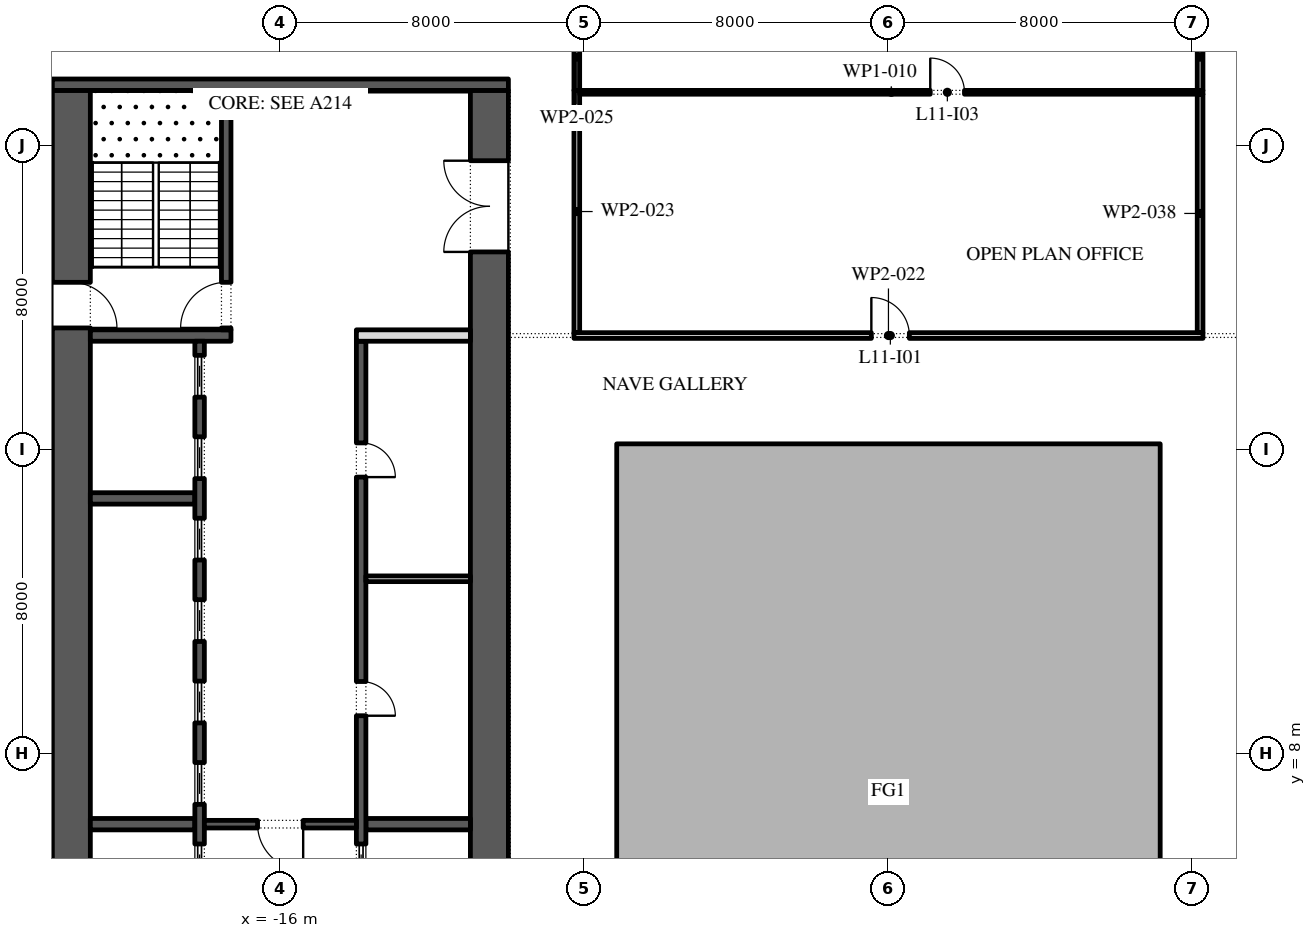
"""IFC4 building model, lengths in metres.
Left out: names, types, materials, properties, quantities, classifications, styles, units other than length and angle.
Written with IfcOpenShell. Run it as: python <this file> out.ifc"""

import sys

from ifc_helpers import new_model, si_unit, direction, frame, frame_2d, origin, place, context, subcontext, project, spatial, polyline, rectangle, outline, extrude, element, fill, save


model = new_model("IFC4")
c1 = context("Model", 3, precision=1e-05, world=origin(), true_north=direction((0.0, 1.0)))
c2 = subcontext(c1, "Body", "Model", "MODEL_VIEW")
j1 = project(units=[si_unit("LENGTHUNIT", "METRE"), si_unit("PLANEANGLEUNIT", "RADIAN")], contexts=[c1])
p1 = place(None, origin())
s1 = spatial("IfcSite", under=j1, at=p1, CompositionType="ELEMENT")
p2 = place(p1, origin())
s2 = spatial("IfcBuilding", under=s1, at=p2, CompositionType="ELEMENT")
p3 = place(p2, frame((0.0, 0.0, 56.4)))
s3 = spatial("IfcBuildingStorey", under=s2, at=p3, CompositionType="ELEMENT", Elevation=56.4)
p4 = place(p3, origin())
e1 = element("IfcWall", 1, at=p4, inside=s3, PredefinedType="STANDARD", context=c2, shape_type="SweptSolid", body=[
    extrude(outline(polyline([(-7.15, -2.15), (7.15, -2.15), (7.15, 16.15), (-7.15, 16.15), (-7.15, -2.15)]), holes=[polyline([(-7.0, -2.0), (-7.0, 16.0), (7.0, 16.0), (7.0, -2.0), (-7.0, -2.0)])]), origin(), (0.0, 0.0, 1.0), 4.0),
])
p5 = place(p3, frame((-21.5, -2.45, 0.0), z_axis=(0.0, 0.0, 1.0), x_axis=(0.0, 1.0, 0.0)))
e2 = element("IfcWall", 2, at=p5, inside=s3, PredefinedType="SHEAR", context=c2, shape_type="SweptSolid", body=[
    extrude(rectangle(XDim=27.9, YDim=1.0, at=frame_2d((13.95, 0.0))), origin(), (0.0, 0.0, 1.0), 4.0),
])
p6 = place(p5, frame((5.05, 0.0, 0.0)))
e3 = element("IfcOpeningElement", 3, at=p6, cuts=e2, PredefinedType="OPENING", context=c2, shape_type="SweptSolid", body=[
    extrude(rectangle(XDim=1.2, YDim=2.1, at=frame_2d((0.6, 1.05))), frame((0.0, 0.51, 0.0), z_axis=(0.0, -1.0, 0.0), x_axis=(1.0, 0.0, 0.0)), (0.0, 0.0, 1.0), 1.02),
])
p7 = place(p5, frame((21.65, 0.0, 0.0)))
e4 = element("IfcOpeningElement", 4, at=p7, cuts=e2, PredefinedType="OPENING", context=c2, shape_type="SweptSolid", body=[
    extrude(rectangle(XDim=1.2, YDim=2.1, at=frame_2d((0.6, 1.05))), frame((0.0, 0.51, 0.0), z_axis=(0.0, -1.0, 0.0), x_axis=(1.0, 0.0, 0.0)), (0.0, 0.0, 1.0), 1.02),
])
p8 = place(p3, frame((-10.5, -2.45, 0.0), z_axis=(0.0, 0.0, 1.0), x_axis=(0.0, 1.0, 0.0)))
e5 = element("IfcWall", 5, at=p8, inside=s3, PredefinedType="SHEAR", context=c2, shape_type="SweptSolid", body=[
    extrude(rectangle(XDim=27.9, YDim=1.0, at=frame_2d((13.95, 0.0))), origin(), (0.0, 0.0, 1.0), 4.0),
])
p9 = place(p8, frame((23.65, 0.0, 0.0)))
e6 = element("IfcOpeningElement", 6, at=p9, cuts=e5, PredefinedType="OPENING", context=c2, shape_type="SweptSolid", body=[
    extrude(rectangle(XDim=2.4, YDim=2.1, at=frame_2d((1.2, 1.05))), frame((0.0, 0.51, 0.0), z_axis=(0.0, -1.0, 0.0), x_axis=(1.0, 0.0, 0.0)), (0.0, 0.0, 1.0), 1.02),
])
p10 = place(p8, frame((1.387, 0.0, 0.0)))
e7 = element("IfcOpeningElement", 7, at=p10, cuts=e5, PredefinedType="OPENING", context=c2, shape_type="SweptSolid", body=[
    extrude(rectangle(XDim=0.9, YDim=2.1, at=frame_2d((0.45, 1.05))), frame((0.0, 0.51, 0.0), z_axis=(0.0, -1.0, 0.0), x_axis=(1.0, 0.0, 0.0)), (0.0, 0.0, 1.0), 1.02),
])
p11 = place(p8, frame((4.613, 0.0, 0.0)))
e8 = element("IfcOpeningElement", 8, at=p11, cuts=e5, PredefinedType="OPENING", context=c2, shape_type="SweptSolid", body=[
    extrude(rectangle(XDim=0.9, YDim=2.1, at=frame_2d((0.45, 1.05))), frame((0.0, 0.51, 0.0), z_axis=(0.0, -1.0, 0.0), x_axis=(1.0, 0.0, 0.0)), (0.0, 0.0, 1.0), 1.02),
])
p12 = place(p3, frame((-22.0, 25.6, 0.0), z_axis=(0.0, 0.0, 1.0), x_axis=(1.0, 0.0, 0.0)))
e9 = element("IfcWall", 9, at=p12, inside=s3, PredefinedType="SHEAR", context=c2, shape_type="SweptSolid", body=[
    extrude(rectangle(XDim=12.0, YDim=0.3, at=frame_2d((6.0, 0.0))), origin(), (0.0, 0.0, 1.0), 4.0),
])
p13 = place(p3, frame((-21.0, 19.0, 0.0), z_axis=(0.0, 0.0, 1.0), x_axis=(1.0, 0.0, 0.0)))
e10 = element("IfcWall", 10, at=p13, inside=s3, PredefinedType="SHEAR", context=c2, shape_type="SweptSolid", body=[
    extrude(rectangle(XDim=3.7, YDim=0.3, at=frame_2d((1.85, 0.0))), origin(), (0.0, 0.0, 1.0), 4.0),
])
p14 = place(p3, frame((-17.425, 19.15, 0.0), z_axis=(0.0, 0.0, 1.0), x_axis=(0.0, 1.0, 0.0)))
e11 = element("IfcWall", 11, at=p14, inside=s3, PredefinedType="SHEAR", context=c2, shape_type="SweptSolid", body=[
    extrude(rectangle(XDim=6.3, YDim=0.25, at=frame_2d((3.15, 0.0))), origin(), (0.0, 0.0, 1.0), 4.0),
])
p15 = place(p14, frame((0.05, 0.0, 0.0)))
e12 = element("IfcOpeningElement", 12, at=p15, cuts=e11, PredefinedType="OPENING", context=c2, shape_type="SweptSolid", body=[
    extrude(rectangle(XDim=1.2, YDim=2.1, at=frame_2d((0.6, 1.05))), frame((0.0, 0.135, 0.0), z_axis=(0.0, -1.0, 0.0), x_axis=(1.0, 0.0, 0.0)), (0.0, 0.0, 1.0), 0.27),
])
for number, where, z_axis, x_axis in (
    (13, (-21.0, 6.143, 0.0), (0.0, 0.0, 1.0), (1.0, 0.0, 0.0)),
    (14, (-21.0, 14.714, 0.0), (0.0, 0.0, 1.0), (1.0, 0.0, 0.0)),
):
    element("IfcWall", number, at=place(p3, frame(where, z_axis=z_axis, x_axis=x_axis)), inside=s3, PredefinedType="SHEAR", context=c2, shape_type="SweptSolid", body=[
        extrude(rectangle(XDim=2.75, YDim=0.3, at=frame_2d((1.375, 0.0))), origin(), (0.0, 0.0, 1.0), 4.0),
    ])
p16 = place(p3, frame((-18.125, 4.15, 0.0), z_axis=(0.0, 0.0, 1.0), x_axis=(0.0, 1.0, 0.0)))
e15 = element("IfcWall", 15, at=p16, inside=s3, PredefinedType="SHEAR", context=c2, shape_type="SweptSolid", body=[
    extrude(rectangle(XDim=14.7, YDim=0.25, at=frame_2d((7.35, 0.0))), origin(), (0.0, 0.0, 1.0), 4.0),
])
p17 = place(p16, frame((0.371, 0.0, 0.0)))
e16 = element("IfcOpeningElement", 16, at=p17, cuts=e15, PredefinedType="OPENING", context=c2, shape_type="SweptSolid", body=[
    extrude(rectangle(XDim=1.1, YDim=2.1, at=frame_2d((0.55, 1.05))), frame((0.0, 0.135, 0.0), z_axis=(0.0, -1.0, 0.0), x_axis=(1.0, 0.0, 0.0)), (0.0, 0.0, 1.0), 0.27),
])
p18 = place(p16, frame((2.514, 0.0, 0.0)))
e17 = element("IfcOpeningElement", 17, at=p18, cuts=e15, PredefinedType="OPENING", context=c2, shape_type="SweptSolid", body=[
    extrude(rectangle(XDim=1.1, YDim=2.1, at=frame_2d((0.55, 1.05))), frame((0.0, 0.135, 0.0), z_axis=(0.0, -1.0, 0.0), x_axis=(1.0, 0.0, 0.0)), (0.0, 0.0, 1.0), 0.27),
])
p19 = place(p16, frame((4.657, 0.0, 0.0)))
e18 = element("IfcOpeningElement", 18, at=p19, cuts=e15, PredefinedType="OPENING", context=c2, shape_type="SweptSolid", body=[
    extrude(rectangle(XDim=1.1, YDim=2.1, at=frame_2d((0.55, 1.05))), frame((0.0, 0.135, 0.0), z_axis=(0.0, -1.0, 0.0), x_axis=(1.0, 0.0, 0.0)), (0.0, 0.0, 1.0), 0.27),
])
p20 = place(p16, frame((6.8, 0.0, 0.0)))
e19 = element("IfcOpeningElement", 19, at=p20, cuts=e15, PredefinedType="OPENING", context=c2, shape_type="SweptSolid", body=[
    extrude(rectangle(XDim=1.1, YDim=2.1, at=frame_2d((0.55, 1.05))), frame((0.0, 0.135, 0.0), z_axis=(0.0, -1.0, 0.0), x_axis=(1.0, 0.0, 0.0)), (0.0, 0.0, 1.0), 0.27),
])
p21 = place(p16, frame((8.943, 0.0, 0.0)))
e20 = element("IfcOpeningElement", 20, at=p21, cuts=e15, PredefinedType="OPENING", context=c2, shape_type="SweptSolid", body=[
    extrude(rectangle(XDim=1.1, YDim=2.1, at=frame_2d((0.55, 1.05))), frame((0.0, 0.135, 0.0), z_axis=(0.0, -1.0, 0.0), x_axis=(1.0, 0.0, 0.0)), (0.0, 0.0, 1.0), 0.27),
])
p22 = place(p16, frame((11.086, 0.0, 0.0)))
e21 = element("IfcOpeningElement", 21, at=p22, cuts=e15, PredefinedType="OPENING", context=c2, shape_type="SweptSolid", body=[
    extrude(rectangle(XDim=1.1, YDim=2.1, at=frame_2d((0.55, 1.05))), frame((0.0, 0.135, 0.0), z_axis=(0.0, -1.0, 0.0), x_axis=(1.0, 0.0, 0.0)), (0.0, 0.0, 1.0), 0.27),
])
p23 = place(p16, frame((13.229, 0.0, 0.0)))
e22 = element("IfcOpeningElement", 22, at=p23, cuts=e15, PredefinedType="OPENING", context=c2, shape_type="SweptSolid", body=[
    extrude(rectangle(XDim=1.1, YDim=2.1, at=frame_2d((0.55, 1.05))), frame((0.0, 0.135, 0.0), z_axis=(0.0, -1.0, 0.0), x_axis=(1.0, 0.0, 0.0)), (0.0, 0.0, 1.0), 0.27),
])
p24 = place(p3, frame((-13.75, 6.143, 0.0), z_axis=(0.0, 0.0, 1.0), x_axis=(1.0, 0.0, 0.0)))
e23 = element("IfcWall", 23, at=p24, inside=s3, PredefinedType="SHEAR", context=c2, shape_type="SweptSolid", body=[
    extrude(rectangle(XDim=2.75, YDim=0.3, at=frame_2d((1.375, 0.0))), origin(), (0.0, 0.0, 1.0), 4.0),
])
p25 = place(p3, frame((-13.875, -2.45, 0.0), z_axis=(0.0, 0.0, 1.0), x_axis=(0.0, 1.0, 0.0)))
e24 = element("IfcWall", 24, at=p25, inside=s3, PredefinedType="SHEAR", context=c2, shape_type="SweptSolid", body=[
    extrude(rectangle(XDim=21.3, YDim=0.25, at=frame_2d((10.65, 0.0))), origin(), (0.0, 0.0, 1.0), 4.0),
])
p26 = place(p25, frame((11.446, 0.0, 0.0)))
e25 = element("IfcOpeningElement", 25, at=p26, cuts=e24, PredefinedType="OPENING", context=c2, shape_type="SweptSolid", body=[
    extrude(rectangle(XDim=0.9, YDim=2.1, at=frame_2d((0.45, 1.05))), frame((0.0, 0.135, 0.0), z_axis=(0.0, -1.0, 0.0), x_axis=(1.0, 0.0, 0.0)), (0.0, 0.0, 1.0), 0.27),
])
p27 = place(p25, frame((17.725, 0.0, 0.0)))
e26 = element("IfcOpeningElement", 26, at=p27, cuts=e24, PredefinedType="OPENING", context=c2, shape_type="SweptSolid", body=[
    extrude(rectangle(XDim=0.9, YDim=2.1, at=frame_2d((0.45, 1.05))), frame((0.0, 0.135, 0.0), z_axis=(0.0, -1.0, 0.0), x_axis=(1.0, 0.0, 0.0)), (0.0, 0.0, 1.0), 0.27),
])
p28 = place(p25, frame((6.971, 0.0, 0.0)))
e27 = element("IfcOpeningElement", 27, at=p28, cuts=e24, PredefinedType="OPENING", context=c2, shape_type="SweptSolid", body=[
    extrude(rectangle(XDim=1.1, YDim=2.1, at=frame_2d((0.55, 1.05))), frame((0.0, 0.135, 0.0), z_axis=(0.0, -1.0, 0.0), x_axis=(1.0, 0.0, 0.0)), (0.0, 0.0, 1.0), 0.27),
])
p29 = place(p3, frame((-14.0, 19.0, 0.0), z_axis=(0.0, 0.0, 1.0), x_axis=(1.0, 0.0, 0.0)))
e28 = element("IfcWall", 28, at=p29, inside=s3, PredefinedType="PARTITIONING", context=c2, shape_type="SweptSolid", body=[
    extrude(rectangle(XDim=3.0, YDim=0.3, at=frame_2d((1.5, 0.0))), origin(), (0.0, 0.0, 1.0), 4.0),
])
p30 = place(p3, frame((-13.75, 12.6, 0.0), z_axis=(0.0, 0.0, 1.0), x_axis=(1.0, 0.0, 0.0)))
e29 = element("IfcWall", 29, at=p30, inside=s3, PredefinedType="PARTITIONING", context=c2, shape_type="SweptSolid", body=[
    extrude(rectangle(XDim=2.75, YDim=0.15, at=frame_2d((1.375, 0.0))), origin(), (0.0, 0.0, 1.0), 4.0),
])
p31 = place(p3, frame((-18.0, 6.143, 0.0), z_axis=(0.0, 0.0, 1.0), x_axis=(1.0, 0.0, 0.0)))
e30 = element("IfcWall", 30, at=p31, inside=s3, PredefinedType="SHEAR", context=c2, shape_type="SweptSolid", body=[
    extrude(rectangle(XDim=4.0, YDim=0.2, at=frame_2d((2.0, 0.0))), origin(), (0.0, 0.0, 1.0), 4.0),
])
p32 = place(p31, frame((1.4, 0.0, 0.0)))
e31 = element("IfcOpeningElement", 31, at=p32, cuts=e30, PredefinedType="OPENING", context=c2, shape_type="SweptSolid", body=[
    extrude(rectangle(XDim=1.2, YDim=2.1, at=frame_2d((0.6, 1.05))), frame((0.0, 0.11, 0.0), z_axis=(0.0, -1.0, 0.0), x_axis=(1.0, 0.0, 0.0)), (0.0, 0.0, 1.0), 0.22),
])
p33 = place(p3, frame((-8.275, 19.0, 0.0), z_axis=(0.0, 0.0, 1.0), x_axis=(1.0, 0.0, 0.0)))
e32 = element("IfcWall", 32, at=p33, inside=s3, PredefinedType="PARTITIONING", context=c2, shape_type="SweptSolid", body=[
    extrude(rectangle(XDim=16.55, YDim=0.15, at=frame_2d((8.275, 0.0))), origin(), (0.0, 0.0, 1.0), 4.0),
])
p34 = place(p33, frame((7.825, 0.0, 0.0)))
e33 = element("IfcOpeningElement", 33, at=p34, cuts=e32, PredefinedType="OPENING", context=c2, shape_type="SweptSolid", body=[
    extrude(rectangle(XDim=1.0, YDim=2.1, at=frame_2d((0.5, 1.05))), frame((0.0, 0.085, 0.0), z_axis=(0.0, -1.0, 0.0), x_axis=(1.0, 0.0, 0.0)), (0.0, 0.0, 1.0), 0.17),
])
p35 = place(p3, frame((-8.2, 25.45, 0.0), z_axis=(0.0, 0.0, 1.0), x_axis=(0.0, -1.0, 0.0)))
e34 = element("IfcWall", 34, at=p35, inside=s3, PredefinedType="PARTITIONING", context=c2, shape_type="SweptSolid", body=[
    extrude(rectangle(XDim=6.375, YDim=0.15, at=frame_2d((3.188, 0.0))), origin(), (0.0, 0.0, 1.0), 4.0),
])
p36 = place(p3, frame((-8.125, 25.4, 0.0), z_axis=(0.0, 0.0, 1.0), x_axis=(1.0, 0.0, 0.0)))
e35 = element("IfcWall", 35, at=p36, inside=s3, PredefinedType="PARTITIONING", context=c2, shape_type="SweptSolid", body=[
    extrude(rectangle(XDim=16.4, YDim=0.1, at=frame_2d((8.2, 0.0))), origin(), (0.0, 0.0, 1.0), 4.0),
])
p37 = place(p36, frame((9.225, 0.0, 0.0)))
e36 = element("IfcOpeningElement", 36, at=p37, cuts=e35, PredefinedType="OPENING", context=c2, shape_type="SweptSolid", body=[
    extrude(rectangle(XDim=0.9, YDim=2.1, at=frame_2d((0.45, 1.05))), frame((0.0, 0.06, 0.0), z_axis=(0.0, -1.0, 0.0), x_axis=(1.0, 0.0, 0.0)), (0.0, 0.0, 1.0), 0.12),
])
p38 = place(p3, frame((-8.2, 27.2, 0.0), z_axis=(0.0, 0.0, 1.0), x_axis=(0.0, -1.0, 0.0)))
e37 = element("IfcWall", 37, at=p38, inside=s3, PredefinedType="PARTITIONING", context=c2, shape_type="SweptSolid", body=[
    extrude(rectangle(XDim=1.75, YDim=0.15, at=frame_2d((0.875, 0.0))), origin(), (0.0, 0.0, 1.0), 4.0),
])
p39 = place(p3, frame((8.2, 19.075, 0.0), z_axis=(0.0, 0.0, 1.0), x_axis=(0.0, 1.0, 0.0)))
e38 = element("IfcWall", 38, at=p39, inside=s3, PredefinedType="PARTITIONING", context=c2, shape_type="SweptSolid", body=[
    extrude(rectangle(XDim=6.275, YDim=0.15, at=frame_2d((3.138, 0.0))), origin(), (0.0, 0.0, 1.0), 4.0),
])
p40 = place(p3, frame((8.2, 25.45, 0.0), z_axis=(0.0, 0.0, 1.0), x_axis=(0.0, 1.0, 0.0)))
e39 = element("IfcWall", 39, at=p40, inside=s3, PredefinedType="PARTITIONING", context=c2, shape_type="SweptSolid", body=[
    extrude(rectangle(XDim=1.75, YDim=0.15, at=frame_2d((0.875, 0.0))), origin(), (0.0, 0.0, 1.0), 4.0),
])
p41 = place(p17, origin())
e40 = element("IfcDoor", 40, at=p41, inside=s3, OperationType="SLIDING_TO_LEFT", PredefinedType="DOOR", context=c2, shape_type="SweptSolid", body=[
    extrude(rectangle(XDim=1.1, YDim=2.1, at=frame_2d((0.55, 1.05))), frame((0.0, 0.025, 0.0), z_axis=(0.0, -1.0, 0.0), x_axis=(1.0, 0.0, 0.0)), (0.0, 0.0, 1.0), 0.05),
])
fill(e16, e40)
p42 = place(p18, origin())
e41 = element("IfcDoor", 41, at=p42, inside=s3, OperationType="SLIDING_TO_LEFT", PredefinedType="DOOR", context=c2, shape_type="SweptSolid", body=[
    extrude(rectangle(XDim=1.1, YDim=2.1, at=frame_2d((0.55, 1.05))), frame((0.0, 0.025, 0.0), z_axis=(0.0, -1.0, 0.0), x_axis=(1.0, 0.0, 0.0)), (0.0, 0.0, 1.0), 0.05),
])
fill(e17, e41)
p43 = place(p19, origin())
e42 = element("IfcDoor", 42, at=p43, inside=s3, OperationType="SLIDING_TO_LEFT", PredefinedType="DOOR", context=c2, shape_type="SweptSolid", body=[
    extrude(rectangle(XDim=1.1, YDim=2.1, at=frame_2d((0.55, 1.05))), frame((0.0, 0.025, 0.0), z_axis=(0.0, -1.0, 0.0), x_axis=(1.0, 0.0, 0.0)), (0.0, 0.0, 1.0), 0.05),
])
fill(e18, e42)
p44 = place(p20, origin())
e43 = element("IfcDoor", 43, at=p44, inside=s3, OperationType="SLIDING_TO_LEFT", PredefinedType="DOOR", context=c2, shape_type="SweptSolid", body=[
    extrude(rectangle(XDim=1.1, YDim=2.1, at=frame_2d((0.55, 1.05))), frame((0.0, 0.025, 0.0), z_axis=(0.0, -1.0, 0.0), x_axis=(1.0, 0.0, 0.0)), (0.0, 0.0, 1.0), 0.05),
])
fill(e19, e43)
p45 = place(p21, origin())
e44 = element("IfcDoor", 44, at=p45, inside=s3, OperationType="SLIDING_TO_LEFT", PredefinedType="DOOR", context=c2, shape_type="SweptSolid", body=[
    extrude(rectangle(XDim=1.1, YDim=2.1, at=frame_2d((0.55, 1.05))), frame((0.0, 0.025, 0.0), z_axis=(0.0, -1.0, 0.0), x_axis=(1.0, 0.0, 0.0)), (0.0, 0.0, 1.0), 0.05),
])
fill(e20, e44)
p46 = place(p22, origin())
e45 = element("IfcDoor", 45, at=p46, inside=s3, OperationType="SLIDING_TO_LEFT", PredefinedType="DOOR", context=c2, shape_type="SweptSolid", body=[
    extrude(rectangle(XDim=1.1, YDim=2.1, at=frame_2d((0.55, 1.05))), frame((0.0, 0.025, 0.0), z_axis=(0.0, -1.0, 0.0), x_axis=(1.0, 0.0, 0.0)), (0.0, 0.0, 1.0), 0.05),
])
fill(e21, e45)
p47 = place(p23, origin())
e46 = element("IfcDoor", 46, at=p47, inside=s3, OperationType="SLIDING_TO_LEFT", PredefinedType="DOOR", context=c2, shape_type="SweptSolid", body=[
    extrude(rectangle(XDim=1.1, YDim=2.1, at=frame_2d((0.55, 1.05))), frame((0.0, 0.025, 0.0), z_axis=(0.0, -1.0, 0.0), x_axis=(1.0, 0.0, 0.0)), (0.0, 0.0, 1.0), 0.05),
])
fill(e22, e46)
p48 = place(p26, frame((0.9, -0.2, 0.0), z_axis=(0.0, 0.0, 1.0), x_axis=(-1.0, 0.0, 0.0)))
e47 = element("IfcDoor", 47, at=p48, inside=s3, OperationType="SINGLE_SWING_LEFT", PredefinedType="DOOR", context=c2, shape_type="SweptSolid", body=[
    extrude(rectangle(XDim=0.9, YDim=2.1, at=frame_2d((0.45, 1.05))), frame((0.0, -0.075, 0.0), z_axis=(0.0, -1.0, 0.0), x_axis=(1.0, 0.0, 0.0)), (0.0, 0.0, 1.0), 0.05),
])
fill(e25, e47)
p49 = place(p27, frame((0.9, -0.2, 0.0), z_axis=(0.0, 0.0, 1.0), x_axis=(-1.0, 0.0, 0.0)))
e48 = element("IfcDoor", 48, at=p49, inside=s3, OperationType="SINGLE_SWING_LEFT", PredefinedType="DOOR", context=c2, shape_type="SweptSolid", body=[
    extrude(rectangle(XDim=0.9, YDim=2.1, at=frame_2d((0.45, 1.05))), frame((0.0, -0.075, 0.0), z_axis=(0.0, -1.0, 0.0), x_axis=(1.0, 0.0, 0.0)), (0.0, 0.0, 1.0), 0.05),
])
fill(e26, e48)
p50 = place(p28, origin())
e49 = element("IfcDoor", 49, at=p50, inside=s3, OperationType="SLIDING_TO_LEFT", PredefinedType="DOOR", context=c2, shape_type="SweptSolid", body=[
    extrude(rectangle(XDim=1.1, YDim=2.1, at=frame_2d((0.55, 1.05))), frame((0.0, 0.025, 0.0), z_axis=(0.0, -1.0, 0.0), x_axis=(1.0, 0.0, 0.0)), (0.0, 0.0, 1.0), 0.05),
])
fill(e27, e49)
p51 = place(p32, frame((1.2, 0.0, 0.0), z_axis=(0.0, 0.0, 1.0), x_axis=(-1.0, 0.0, 0.0)))
e50 = element("IfcDoor", 50, at=p51, inside=s3, OperationType="SINGLE_SWING_RIGHT", PredefinedType="DOOR", context=c2, shape_type="SweptSolid", body=[
    extrude(rectangle(XDim=1.2, YDim=2.1, at=frame_2d((0.6, 1.05))), frame((0.0, 0.025, 0.0), z_axis=(0.0, -1.0, 0.0), x_axis=(1.0, 0.0, 0.0)), (0.0, 0.0, 1.0), 0.05),
])
fill(e31, e50)
p52 = place(p9, origin())
e51 = element("IfcDoor", 51, at=p52, inside=s3, OperationType="DOUBLE_DOOR_SINGLE_SWING", PredefinedType="DOOR", context=c2, shape_type="SweptSolid", body=[
    extrude(rectangle(XDim=2.4, YDim=2.1, at=frame_2d((1.2, 1.05))), frame((0.0, 0.025, 0.0), z_axis=(0.0, -1.0, 0.0), x_axis=(1.0, 0.0, 0.0)), (0.0, 0.0, 1.0), 0.05),
])
fill(e6, e51)
p53 = place(p15, origin())
e52 = element("IfcDoor", 52, at=p53, inside=s3, OperationType="SINGLE_SWING_RIGHT", PredefinedType="DOOR", context=c2, shape_type="SweptSolid", body=[
    extrude(rectangle(XDim=1.2, YDim=2.1, at=frame_2d((0.6, 1.05))), frame((0.0, 0.025, 0.0), z_axis=(0.0, -1.0, 0.0), x_axis=(1.0, 0.0, 0.0)), (0.0, 0.0, 1.0), 0.05),
])
fill(e12, e52)
p54 = place(p7, frame((1.2, 0.0, 0.0), z_axis=(0.0, 0.0, 1.0), x_axis=(-1.0, 0.0, 0.0)))
e53 = element("IfcDoor", 53, at=p54, inside=s3, OperationType="SINGLE_SWING_LEFT", PredefinedType="DOOR", context=c2, shape_type="SweptSolid", body=[
    extrude(rectangle(XDim=1.2, YDim=2.1, at=frame_2d((0.6, 1.05))), frame((0.0, 0.025, 0.0), z_axis=(0.0, -1.0, 0.0), x_axis=(1.0, 0.0, 0.0)), (0.0, 0.0, 1.0), 0.05),
])
fill(e4, e53)
p55 = place(p34, origin())
e54 = element("IfcDoor", 54, at=p55, inside=s3, OperationType="SINGLE_SWING_RIGHT", PredefinedType="DOOR", context=c2, shape_type="SweptSolid", body=[
    extrude(rectangle(XDim=1.0, YDim=2.1, at=frame_2d((0.5, 1.05))), frame((0.0, 0.025, 0.0), z_axis=(0.0, -1.0, 0.0), x_axis=(1.0, 0.0, 0.0)), (0.0, 0.0, 1.0), 0.05),
])
fill(e33, e54)
p56 = place(p37, origin())
e55 = element("IfcDoor", 55, at=p56, inside=s3, OperationType="SINGLE_SWING_RIGHT", PredefinedType="DOOR", context=c2, shape_type="SweptSolid", body=[
    extrude(rectangle(XDim=0.9, YDim=2.1, at=frame_2d((0.45, 1.05))), frame((0.0, 0.025, 0.0), z_axis=(0.0, -1.0, 0.0), x_axis=(1.0, 0.0, 0.0)), (0.0, 0.0, 1.0), 0.05),
])
fill(e36, e55)
save(model, sys.argv[1])
